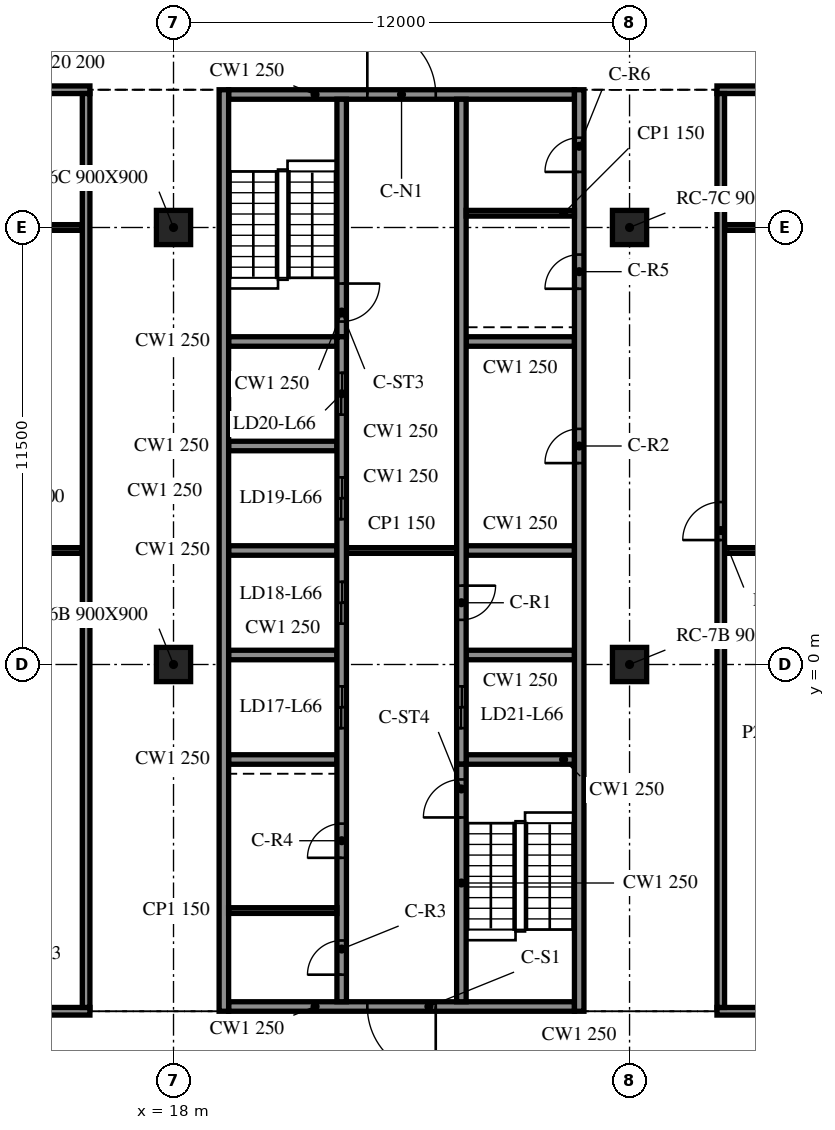
"""IFC4 building model, lengths in metres.
Left out: names, types, materials, properties, quantities, classifications, styles, units other than length and angle.
Written with IfcOpenShell. Run it as: python <this file> out.ifc"""

import sys

from ifc_helpers import new_model, si_unit, direction, frame, frame_2d, origin, origin_2d, place, context, subcontext, project, spatial, rectangle, extrude, element, fill, save


model = new_model("IFC4")
c1 = context("Model", 3, precision=1e-05, world=origin(), true_north=direction((0.0, 1.0)))
c2 = subcontext(c1, "Body", "Model", "MODEL_VIEW")
j1 = project(units=[si_unit("LENGTHUNIT", "METRE"), si_unit("PLANEANGLEUNIT", "RADIAN")], contexts=[c1])
p1 = place(None, origin())
s1 = spatial("IfcSite", under=j1, at=p1, CompositionType="ELEMENT")
p2 = place(p1, origin())
s2 = spatial("IfcBuilding", under=s1, at=p2, CompositionType="ELEMENT")
p3 = place(p2, frame((0.0, 0.0, 270.9)))
s3 = spatial("IfcBuildingStorey", under=s2, at=p3, CompositionType="ELEMENT", Elevation=270.9)
for number, where, z_axis, x_axis in (
    (1, (18.0, 0.0, -0.34), (0.0, 0.0, 1.0), (1.0, 0.0, 0.0)),
    (2, (18.0, 11.5, -0.34), (0.0, 0.0, 1.0), (1.0, 0.0, 0.0)),
    (3, (30.0, 0.0, -0.34), (0.0, 0.0, 1.0), (1.0, 0.0, 0.0)),
    (4, (30.0, 11.5, -0.34), (0.0, 0.0, 1.0), (1.0, 0.0, 0.0)),
):
    element("IfcColumn", number, at=place(p3, frame(where, z_axis=z_axis, x_axis=x_axis)), inside=s3, PredefinedType="COLUMN", context=c2, shape_type="SweptSolid", body=[
        extrude(rectangle(XDim=0.9, YDim=0.9, at=origin_2d()), origin(), (0.0, 0.0, 1.0), 3.8),
    ])
p4 = place(p3, frame((19.325, 15.125, 0.0), z_axis=(0.0, 0.0, 1.0), x_axis=(0.0, -1.0, 0.0)))
e5 = element("IfcWall", 5, at=p4, inside=s3, PredefinedType="SOLIDWALL", context=c2, shape_type="SweptSolid", body=[
    extrude(rectangle(XDim=24.25, YDim=0.25, at=frame_2d((12.125, 0.0))), origin(), (0.0, 0.0, 1.0), 3.46),
])
p5 = place(p3, frame((28.675, -9.125, 0.0), z_axis=(0.0, 0.0, 1.0), x_axis=(0.0, 1.0, 0.0)))
e6 = element("IfcWall", 6, at=p5, inside=s3, PredefinedType="SOLIDWALL", context=c2, shape_type="SweptSolid", body=[
    extrude(rectangle(XDim=24.25, YDim=0.25, at=frame_2d((12.125, 0.0))), origin(), (0.0, 0.0, 1.0), 3.46),
])
p6 = place(p5, frame((14.425, 0.0, 0.0)))
e7 = element("IfcOpeningElement", 7, at=p6, cuts=e6, PredefinedType="OPENING", context=c2, shape_type="SweptSolid", body=[
    extrude(rectangle(XDim=0.9, YDim=2.1, at=frame_2d((0.45, 1.05))), frame((0.0, 0.135, 0.0), z_axis=(0.0, -1.0, 0.0), x_axis=(1.0, 0.0, 0.0)), (0.0, 0.0, 1.0), 0.27),
])
p7 = place(p5, frame((19.012, 0.0, 0.0)))
e8 = element("IfcOpeningElement", 8, at=p7, cuts=e6, PredefinedType="OPENING", context=c2, shape_type="SweptSolid", body=[
    extrude(rectangle(XDim=0.9, YDim=2.1, at=frame_2d((0.45, 1.05))), frame((0.0, 0.135, 0.0), z_axis=(0.0, -1.0, 0.0), x_axis=(1.0, 0.0, 0.0)), (0.0, 0.0, 1.0), 0.27),
])
p8 = place(p5, frame((22.087, 0.0, 0.0)))
e9 = element("IfcOpeningElement", 9, at=p8, cuts=e6, PredefinedType="OPENING", context=c2, shape_type="SweptSolid", body=[
    extrude(rectangle(XDim=0.9, YDim=2.1, at=frame_2d((0.45, 1.05))), frame((0.0, 0.135, 0.0), z_axis=(0.0, -1.0, 0.0), x_axis=(1.0, 0.0, 0.0)), (0.0, 0.0, 1.0), 0.27),
])
p9 = place(p3, frame((28.55, -9.0, 0.0), z_axis=(0.0, 0.0, 1.0), x_axis=(-1.0, 0.0, 0.0)))
e10 = element("IfcWall", 10, at=p9, inside=s3, PredefinedType="SOLIDWALL", context=c2, shape_type="SweptSolid", body=[
    extrude(rectangle(XDim=9.1, YDim=0.25, at=frame_2d((4.55, 0.0))), origin(), (0.0, 0.0, 1.0), 3.46),
])
p10 = place(p9, frame((3.65, 0.0, 0.0)))
e11 = element("IfcOpeningElement", 11, at=p10, cuts=e10, PredefinedType="OPENING", context=c2, shape_type="SweptSolid", body=[
    extrude(rectangle(XDim=1.8, YDim=2.1, at=frame_2d((0.9, 1.05))), frame((0.0, 0.135, 0.0), z_axis=(0.0, -1.0, 0.0), x_axis=(1.0, 0.0, 0.0)), (0.0, 0.0, 1.0), 0.27),
])
p11 = place(p3, frame((19.45, 15.0, 0.0), z_axis=(0.0, 0.0, 1.0), x_axis=(1.0, 0.0, 0.0)))
e12 = element("IfcWall", 12, at=p11, inside=s3, PredefinedType="SOLIDWALL", context=c2, shape_type="SweptSolid", body=[
    extrude(rectangle(XDim=9.1, YDim=0.25, at=frame_2d((4.55, 0.0))), origin(), (0.0, 0.0, 1.0), 3.46),
])
p12 = place(p11, frame((3.65, 0.0, 0.0)))
e13 = element("IfcOpeningElement", 13, at=p12, cuts=e12, PredefinedType="OPENING", context=c2, shape_type="SweptSolid", body=[
    extrude(rectangle(XDim=1.8, YDim=2.1, at=frame_2d((0.9, 1.05))), frame((0.0, 0.135, 0.0), z_axis=(0.0, -1.0, 0.0), x_axis=(1.0, 0.0, 0.0)), (0.0, 0.0, 1.0), 0.27),
])
p13 = place(p3, frame((22.425, -8.875, 0.0), z_axis=(0.0, 0.0, 1.0), x_axis=(0.0, 1.0, 0.0)))
e14 = element("IfcWall", 14, at=p13, inside=s3, PredefinedType="SOLIDWALL", context=c2, shape_type="SweptSolid", body=[
    extrude(rectangle(XDim=17.5, YDim=0.25, at=frame_2d((8.75, 0.0))), origin(), (0.0, 0.0, 1.0), 3.46),
])
p14 = place(p13, frame((7.2, 0.0, 0.0)))
e15 = element("IfcOpeningElement", 15, at=p14, cuts=e14, PredefinedType="OPENING", context=c2, shape_type="SweptSolid", body=[
    extrude(rectangle(XDim=1.1, YDim=2.1, at=frame_2d((0.55, 1.05))), frame((0.0, 0.135, 0.0), z_axis=(0.0, -1.0, 0.0), x_axis=(1.0, 0.0, 0.0)), (0.0, 0.0, 1.0), 0.27),
])
p15 = place(p13, frame((9.95, 0.0, 0.0)))
e16 = element("IfcOpeningElement", 16, at=p15, cuts=e14, PredefinedType="OPENING", context=c2, shape_type="SweptSolid", body=[
    extrude(rectangle(XDim=1.1, YDim=2.1, at=frame_2d((0.55, 1.05))), frame((0.0, 0.135, 0.0), z_axis=(0.0, -1.0, 0.0), x_axis=(1.0, 0.0, 0.0)), (0.0, 0.0, 1.0), 0.27),
])
p16 = place(p13, frame((12.7, 0.0, 0.0)))
e17 = element("IfcOpeningElement", 17, at=p16, cuts=e14, PredefinedType="OPENING", context=c2, shape_type="SweptSolid", body=[
    extrude(rectangle(XDim=1.1, YDim=2.1, at=frame_2d((0.55, 1.05))), frame((0.0, 0.135, 0.0), z_axis=(0.0, -1.0, 0.0), x_axis=(1.0, 0.0, 0.0)), (0.0, 0.0, 1.0), 0.27),
])
p17 = place(p13, frame((15.45, 0.0, 0.0)))
e18 = element("IfcOpeningElement", 18, at=p17, cuts=e14, PredefinedType="OPENING", context=c2, shape_type="SweptSolid", body=[
    extrude(rectangle(XDim=1.1, YDim=2.1, at=frame_2d((0.55, 1.05))), frame((0.0, 0.135, 0.0), z_axis=(0.0, -1.0, 0.0), x_axis=(1.0, 0.0, 0.0)), (0.0, 0.0, 1.0), 0.27),
])
p18 = place(p13, frame((0.712, 0.0, 0.0)))
e19 = element("IfcOpeningElement", 19, at=p18, cuts=e14, PredefinedType="OPENING", context=c2, shape_type="SweptSolid", body=[
    extrude(rectangle(XDim=0.9, YDim=2.1, at=frame_2d((0.45, 1.05))), frame((0.0, 0.135, 0.0), z_axis=(0.0, -1.0, 0.0), x_axis=(1.0, 0.0, 0.0)), (0.0, 0.0, 1.0), 0.27),
])
p19 = place(p13, frame((3.788, 0.0, 0.0)))
e20 = element("IfcOpeningElement", 20, at=p19, cuts=e14, PredefinedType="OPENING", context=c2, shape_type="SweptSolid", body=[
    extrude(rectangle(XDim=0.9, YDim=2.1, at=frame_2d((0.45, 1.05))), frame((0.0, 0.135, 0.0), z_axis=(0.0, -1.0, 0.0), x_axis=(1.0, 0.0, 0.0)), (0.0, 0.0, 1.0), 0.27),
])
p20 = place(p3, frame((22.425, 14.875, 0.0), z_axis=(0.0, 0.0, 1.0), x_axis=(0.0, -1.0, 0.0)))
e21 = element("IfcWall", 21, at=p20, inside=s3, PredefinedType="SOLIDWALL", context=c2, shape_type="SweptSolid", body=[
    extrude(rectangle(XDim=6.25, YDim=0.25, at=frame_2d((3.125, 0.0))), origin(), (0.0, 0.0, 1.0), 3.46),
])
p21 = place(p20, frame((4.85, 0.0, 0.0)))
e22 = element("IfcOpeningElement", 22, at=p21, cuts=e21, PredefinedType="OPENING", context=c2, shape_type="SweptSolid", body=[
    extrude(rectangle(XDim=1.0, YDim=2.1, at=frame_2d((0.5, 1.05))), frame((0.0, 0.135, 0.0), z_axis=(0.0, -1.0, 0.0), x_axis=(1.0, 0.0, 0.0)), (0.0, 0.0, 1.0), 0.27),
])
p22 = place(p3, frame((25.575, -8.875, 0.0), z_axis=(0.0, 0.0, 1.0), x_axis=(0.0, 1.0, 0.0)))
e23 = element("IfcWall", 23, at=p22, inside=s3, PredefinedType="SOLIDWALL", context=c2, shape_type="SweptSolid", body=[
    extrude(rectangle(XDim=6.25, YDim=0.25, at=frame_2d((3.125, 0.0))), origin(), (0.0, 0.0, 1.0), 3.46),
])
p23 = place(p22, frame((4.85, 0.0, 0.0)))
e24 = element("IfcOpeningElement", 24, at=p23, cuts=e23, PredefinedType="OPENING", context=c2, shape_type="SweptSolid", body=[
    extrude(rectangle(XDim=1.0, YDim=2.1, at=frame_2d((0.5, 1.05))), frame((0.0, 0.135, 0.0), z_axis=(0.0, -1.0, 0.0), x_axis=(1.0, 0.0, 0.0)), (0.0, 0.0, 1.0), 0.27),
])
p24 = place(p3, frame((25.575, 14.875, 0.0), z_axis=(0.0, 0.0, 1.0), x_axis=(0.0, -1.0, 0.0)))
e25 = element("IfcWall", 25, at=p24, inside=s3, PredefinedType="SOLIDWALL", context=c2, shape_type="SweptSolid", body=[
    extrude(rectangle(XDim=17.5, YDim=0.25, at=frame_2d((8.75, 0.0))), origin(), (0.0, 0.0, 1.0), 3.46),
])
p25 = place(p24, frame((15.45, 0.0, 0.0)))
e26 = element("IfcOpeningElement", 26, at=p25, cuts=e25, PredefinedType="OPENING", context=c2, shape_type="SweptSolid", body=[
    extrude(rectangle(XDim=1.1, YDim=2.1, at=frame_2d((0.55, 1.05))), frame((0.0, 0.135, 0.0), z_axis=(0.0, -1.0, 0.0), x_axis=(1.0, 0.0, 0.0)), (0.0, 0.0, 1.0), 0.27),
])
p26 = place(p24, frame((12.8, 0.0, 0.0)))
e27 = element("IfcOpeningElement", 27, at=p26, cuts=e25, PredefinedType="OPENING", context=c2, shape_type="SweptSolid", body=[
    extrude(rectangle(XDim=0.9, YDim=2.1, at=frame_2d((0.45, 1.05))), frame((0.0, 0.135, 0.0), z_axis=(0.0, -1.0, 0.0), x_axis=(1.0, 0.0, 0.0)), (0.0, 0.0, 1.0), 0.27),
])
for number, where, z_axis, x_axis in (
    (28, (19.45, -2.5, 0.0), (0.0, 0.0, 1.0), (1.0, 0.0, 0.0)),
    (29, (19.45, 0.25, 0.0), (0.0, 0.0, 1.0), (1.0, 0.0, 0.0)),
    (30, (19.45, 3.0, 0.0), (0.0, 0.0, 1.0), (1.0, 0.0, 0.0)),
    (31, (19.45, 5.75, 0.0), (0.0, 0.0, 1.0), (1.0, 0.0, 0.0)),
    (32, (19.45, 8.5, 0.0), (0.0, 0.0, 1.0), (1.0, 0.0, 0.0)),
    (33, (25.7, -2.5, 0.0), (0.0, 0.0, 1.0), (1.0, 0.0, 0.0)),
    (34, (25.7, 0.25, 0.0), (0.0, 0.0, 1.0), (1.0, 0.0, 0.0)),
    (35, (25.7, 3.0, 0.0), (0.0, 0.0, 1.0), (1.0, 0.0, 0.0)),
    (36, (25.7, 8.5, 0.0), (0.0, 0.0, 1.0), (1.0, 0.0, 0.0)),
):
    element("IfcWall", number, at=place(p3, frame(where, z_axis=z_axis, x_axis=x_axis)), inside=s3, PredefinedType="SOLIDWALL", context=c2, shape_type="SweptSolid", body=[
        extrude(rectangle(XDim=2.85, YDim=0.25, at=frame_2d((1.425, 0.0))), origin(), (0.0, 0.0, 1.0), 3.46),
    ])
p27 = place(p3, frame((22.55, 3.0, 0.0), z_axis=(0.0, 0.0, 1.0), x_axis=(1.0, 0.0, 0.0)))
e37 = element("IfcWall", 37, at=p27, inside=s3, PredefinedType="PARTITIONING", context=c2, shape_type="SweptSolid", body=[
    extrude(rectangle(XDim=2.9, YDim=0.15, at=frame_2d((1.45, 0.0))), origin(), (0.0, 0.0, 1.0), 3.46),
])
for number, where, z_axis, x_axis in (
    (38, (19.45, -6.475, 0.0), (0.0, 0.0, 1.0), (1.0, 0.0, 0.0)),
    (39, (25.7, 11.875, 0.0), (0.0, 0.0, 1.0), (1.0, 0.0, 0.0)),
):
    element("IfcWall", number, at=place(p3, frame(where, z_axis=z_axis, x_axis=x_axis)), inside=s3, PredefinedType="PARTITIONING", context=c2, shape_type="SweptSolid", body=[
        extrude(rectangle(XDim=2.85, YDim=0.15, at=frame_2d((1.425, 0.0))), origin(), (0.0, 0.0, 1.0), 3.46),
    ])
p28 = place(p3, frame((8.1, -9.125, 0.0), z_axis=(0.0, 0.0, 1.0), x_axis=(1.0, 0.0, 0.0)))
e40 = element("IfcWall", 40, at=p28, inside=s3, PredefinedType="PARTITIONING", context=c2, shape_type="SweptSolid", body=[
    extrude(rectangle(XDim=7.7, YDim=0.2, at=frame_2d((3.85, 0.0))), origin(), (0.0, 0.0, 1.0), 3.46),
])
p29 = place(p28, frame((3.3, 0.0, 0.0)))
e41 = element("IfcOpeningElement", 41, at=p29, cuts=e40, PredefinedType="OPENING", context=c2, shape_type="SweptSolid", body=[
    extrude(rectangle(XDim=1.0, YDim=2.1, at=frame_2d((0.5, 1.05))), frame((0.0, 0.11, 0.0), z_axis=(0.0, -1.0, 0.0), x_axis=(1.0, 0.0, 0.0)), (0.0, 0.0, 1.0), 0.22),
])
p30 = place(p3, frame((32.3, -9.125, 0.0), z_axis=(0.0, 0.0, 1.0), x_axis=(1.0, 0.0, 0.0)))
e42 = element("IfcWall", 42, at=p30, inside=s3, PredefinedType="PARTITIONING", context=c2, shape_type="SweptSolid", body=[
    extrude(rectangle(XDim=15.202, YDim=0.2, at=frame_2d((7.601, 0.0))), origin(), (0.0, 0.0, 1.0), 3.46),
])
p31 = place(p30, frame((7.1, 0.0, 0.0)))
e43 = element("IfcOpeningElement", 43, at=p31, cuts=e42, PredefinedType="OPENING", context=c2, shape_type="SweptSolid", body=[
    extrude(rectangle(XDim=1.0, YDim=2.1, at=frame_2d((0.5, 1.05))), frame((0.0, 0.11, 0.0), z_axis=(0.0, -1.0, 0.0), x_axis=(1.0, 0.0, 0.0)), (0.0, 0.0, 1.0), 0.22),
])
p32 = place(p3, frame((8.3, 3.0, 0.0), z_axis=(0.0, 0.0, 1.0), x_axis=(1.0, 0.0, 0.0)))
e44 = element("IfcWall", 44, at=p32, inside=s3, PredefinedType="PARTITIONING", context=c2, shape_type="SweptSolid", body=[
    extrude(rectangle(XDim=7.3, YDim=0.15, at=frame_2d((3.65, 0.0))), origin(), (0.0, 0.0, 1.0), 3.46),
])
p33 = place(p3, frame((32.5, 3.0, 0.0), z_axis=(0.0, 0.0, 1.0), x_axis=(1.0, 0.0, 0.0)))
e45 = element("IfcWall", 45, at=p33, inside=s3, PredefinedType="PARTITIONING", context=c2, shape_type="SweptSolid", body=[
    extrude(rectangle(XDim=15.475, YDim=0.15, at=frame_2d((7.738, 0.0))), origin(), (0.0, 0.0, 1.0), 3.46),
])
p34 = place(p3, frame((8.3, 11.5, 0.0), z_axis=(0.0, 0.0, 1.0), x_axis=(1.0, 0.0, 0.0)))
e46 = element("IfcWall", 46, at=p34, inside=s3, PredefinedType="PARTITIONING", context=c2, shape_type="SweptSolid", body=[
    extrude(rectangle(XDim=7.3, YDim=0.15, at=frame_2d((3.65, 0.0))), origin(), (0.0, 0.0, 1.0), 3.46),
])
p35 = place(p3, frame((32.5, 11.5, 0.0), z_axis=(0.0, 0.0, 1.0), x_axis=(1.0, 0.0, 0.0)))
e47 = element("IfcWall", 47, at=p35, inside=s3, PredefinedType="PARTITIONING", context=c2, shape_type="SweptSolid", body=[
    extrude(rectangle(XDim=9.05, YDim=0.15, at=frame_2d((4.525, 0.0))), origin(), (0.0, 0.0, 1.0), 3.46),
])
p36 = place(p3, frame((8.1, 15.125, 0.0), z_axis=(0.0, 0.0, 1.0), x_axis=(1.0, 0.0, 0.0)))
e48 = element("IfcWall", 48, at=p36, inside=s3, PredefinedType="PARTITIONING", context=c2, shape_type="SweptSolid", body=[
    extrude(rectangle(XDim=7.7, YDim=0.2, at=frame_2d((3.85, 0.0))), origin(), (0.0, 0.0, 1.0), 3.46),
])
p37 = place(p36, frame((3.3, 0.0, 0.0)))
e49 = element("IfcOpeningElement", 49, at=p37, cuts=e48, PredefinedType="OPENING", context=c2, shape_type="SweptSolid", body=[
    extrude(rectangle(XDim=1.0, YDim=2.1, at=frame_2d((0.5, 1.05))), frame((0.0, 0.11, 0.0), z_axis=(0.0, -1.0, 0.0), x_axis=(1.0, 0.0, 0.0)), (0.0, 0.0, 1.0), 0.22),
])
p38 = place(p3, frame((32.3, 15.125, 0.0), z_axis=(0.0, 0.0, 1.0), x_axis=(1.0, 0.0, 0.0)))
e50 = element("IfcWall", 50, at=p38, inside=s3, PredefinedType="PARTITIONING", context=c2, shape_type="SweptSolid", body=[
    extrude(rectangle(XDim=15.675, YDim=0.2, at=frame_2d((7.837, 0.0))), origin(), (0.0, 0.0, 1.0), 3.46),
])
p39 = place(p38, frame((7.3, 0.0, 0.0)))
e51 = element("IfcOpeningElement", 51, at=p39, cuts=e50, PredefinedType="OPENING", context=c2, shape_type="SweptSolid", body=[
    extrude(rectangle(XDim=1.0, YDim=2.1, at=frame_2d((0.5, 1.05))), frame((0.0, 0.11, 0.0), z_axis=(0.0, -1.0, 0.0), x_axis=(1.0, 0.0, 0.0)), (0.0, 0.0, 1.0), 0.22),
])
p40 = place(p3, frame((15.7, -9.025, 0.0), z_axis=(0.0, 0.0, 1.0), x_axis=(0.0, 1.0, 0.0)))
e52 = element("IfcWall", 52, at=p40, inside=s3, PredefinedType="PARTITIONING", context=c2, shape_type="SweptSolid", body=[
    extrude(rectangle(XDim=24.05, YDim=0.2, at=frame_2d((12.025, 0.0))), origin(), (0.0, 0.0, 1.0), 3.46),
])
p41 = place(p3, frame((32.4, -9.025, 0.0), z_axis=(0.0, 0.0, 1.0), x_axis=(0.0, 1.0, 0.0)))
e53 = element("IfcWall", 53, at=p41, inside=s3, PredefinedType="PARTITIONING", context=c2, shape_type="SweptSolid", body=[
    extrude(rectangle(XDim=24.05, YDim=0.2, at=frame_2d((12.025, 0.0))), origin(), (0.0, 0.0, 1.0), 3.46),
])
p42 = place(p41, frame((12.3, 0.0, 0.0)))
e54 = element("IfcOpeningElement", 54, at=p42, cuts=e53, PredefinedType="OPENING", context=c2, shape_type="SweptSolid", body=[
    extrude(rectangle(XDim=1.0, YDim=2.1, at=frame_2d((0.5, 1.05))), frame((0.0, 0.11, 0.0), z_axis=(0.0, -1.0, 0.0), x_axis=(1.0, 0.0, 0.0)), (0.0, 0.0, 1.0), 0.22),
])
p43 = place(p10, origin())
e55 = element("IfcDoor", 55, at=p43, inside=s3, OperationType="DOUBLE_DOOR_SINGLE_SWING", PredefinedType="DOOR", context=c2, shape_type="SweptSolid", body=[
    extrude(rectangle(XDim=1.8, YDim=2.1, at=frame_2d((0.9, 1.05))), frame((0.0, 0.025, 0.0), z_axis=(0.0, -1.0, 0.0), x_axis=(1.0, 0.0, 0.0)), (0.0, 0.0, 1.0), 0.05),
])
fill(e11, e55)
p44 = place(p12, origin())
e56 = element("IfcDoor", 56, at=p44, inside=s3, OperationType="DOUBLE_DOOR_SINGLE_SWING", PredefinedType="DOOR", context=c2, shape_type="SweptSolid", body=[
    extrude(rectangle(XDim=1.8, YDim=2.1, at=frame_2d((0.9, 1.05))), frame((0.0, 0.025, 0.0), z_axis=(0.0, -1.0, 0.0), x_axis=(1.0, 0.0, 0.0)), (0.0, 0.0, 1.0), 0.05),
])
fill(e13, e56)
p45 = place(p25, origin())
e57 = element("IfcDoor", 57, at=p45, inside=s3, OperationType="DOUBLE_DOOR_SLIDING", PredefinedType="DOOR", context=c2, shape_type="SweptSolid", body=[
    extrude(rectangle(XDim=1.1, YDim=2.1, at=frame_2d((0.55, 1.05))), frame((0.0, 0.025, 0.0), z_axis=(0.0, -1.0, 0.0), x_axis=(1.0, 0.0, 0.0)), (0.0, 0.0, 1.0), 0.05),
])
fill(e26, e57)
p46 = place(p14, origin())
e58 = element("IfcDoor", 58, at=p46, inside=s3, OperationType="DOUBLE_DOOR_SLIDING", PredefinedType="DOOR", context=c2, shape_type="SweptSolid", body=[
    extrude(rectangle(XDim=1.1, YDim=2.1, at=frame_2d((0.55, 1.05))), frame((0.0, 0.025, 0.0), z_axis=(0.0, -1.0, 0.0), x_axis=(1.0, 0.0, 0.0)), (0.0, 0.0, 1.0), 0.05),
])
fill(e15, e58)
p47 = place(p15, origin())
e59 = element("IfcDoor", 59, at=p47, inside=s3, OperationType="DOUBLE_DOOR_SLIDING", PredefinedType="DOOR", context=c2, shape_type="SweptSolid", body=[
    extrude(rectangle(XDim=1.1, YDim=2.1, at=frame_2d((0.55, 1.05))), frame((0.0, 0.025, 0.0), z_axis=(0.0, -1.0, 0.0), x_axis=(1.0, 0.0, 0.0)), (0.0, 0.0, 1.0), 0.05),
])
fill(e16, e59)
p48 = place(p16, origin())
e60 = element("IfcDoor", 60, at=p48, inside=s3, OperationType="DOUBLE_DOOR_SLIDING", PredefinedType="DOOR", context=c2, shape_type="SweptSolid", body=[
    extrude(rectangle(XDim=1.1, YDim=2.1, at=frame_2d((0.55, 1.05))), frame((0.0, 0.025, 0.0), z_axis=(0.0, -1.0, 0.0), x_axis=(1.0, 0.0, 0.0)), (0.0, 0.0, 1.0), 0.05),
])
fill(e17, e60)
p49 = place(p17, origin())
e61 = element("IfcDoor", 61, at=p49, inside=s3, OperationType="DOUBLE_DOOR_SLIDING", PredefinedType="DOOR", context=c2, shape_type="SweptSolid", body=[
    extrude(rectangle(XDim=1.1, YDim=2.1, at=frame_2d((0.55, 1.05))), frame((0.0, 0.025, 0.0), z_axis=(0.0, -1.0, 0.0), x_axis=(1.0, 0.0, 0.0)), (0.0, 0.0, 1.0), 0.05),
])
fill(e18, e61)
p50 = place(p26, origin())
e62 = element("IfcDoor", 62, at=p50, inside=s3, OperationType="SINGLE_SWING_LEFT", PredefinedType="DOOR", context=c2, shape_type="SweptSolid", body=[
    extrude(rectangle(XDim=0.9, YDim=2.1, at=frame_2d((0.45, 1.05))), frame((0.0, 0.025, 0.0), z_axis=(0.0, -1.0, 0.0), x_axis=(1.0, 0.0, 0.0)), (0.0, 0.0, 1.0), 0.05),
])
fill(e27, e62)
p51 = place(p6, origin())
e63 = element("IfcDoor", 63, at=p51, inside=s3, OperationType="SINGLE_SWING_RIGHT", PredefinedType="DOOR", context=c2, shape_type="SweptSolid", body=[
    extrude(rectangle(XDim=0.9, YDim=2.1, at=frame_2d((0.45, 1.05))), frame((0.0, 0.025, 0.0), z_axis=(0.0, -1.0, 0.0), x_axis=(1.0, 0.0, 0.0)), (0.0, 0.0, 1.0), 0.05),
])
fill(e7, e63)
p52 = place(p18, origin())
e64 = element("IfcDoor", 64, at=p52, inside=s3, OperationType="SINGLE_SWING_LEFT", PredefinedType="DOOR", context=c2, shape_type="SweptSolid", body=[
    extrude(rectangle(XDim=0.9, YDim=2.1, at=frame_2d((0.45, 1.05))), frame((0.0, 0.025, 0.0), z_axis=(0.0, -1.0, 0.0), x_axis=(1.0, 0.0, 0.0)), (0.0, 0.0, 1.0), 0.05),
])
fill(e19, e64)
p53 = place(p19, origin())
e65 = element("IfcDoor", 65, at=p53, inside=s3, OperationType="SINGLE_SWING_RIGHT", PredefinedType="DOOR", context=c2, shape_type="SweptSolid", body=[
    extrude(rectangle(XDim=0.9, YDim=2.1, at=frame_2d((0.45, 1.05))), frame((0.0, 0.025, 0.0), z_axis=(0.0, -1.0, 0.0), x_axis=(1.0, 0.0, 0.0)), (0.0, 0.0, 1.0), 0.05),
])
fill(e20, e65)
p54 = place(p7, origin())
e66 = element("IfcDoor", 66, at=p54, inside=s3, OperationType="SINGLE_SWING_LEFT", PredefinedType="DOOR", context=c2, shape_type="SweptSolid", body=[
    extrude(rectangle(XDim=0.9, YDim=2.1, at=frame_2d((0.45, 1.05))), frame((0.0, 0.025, 0.0), z_axis=(0.0, -1.0, 0.0), x_axis=(1.0, 0.0, 0.0)), (0.0, 0.0, 1.0), 0.05),
])
fill(e8, e66)
p55 = place(p8, origin())
e67 = element("IfcDoor", 67, at=p55, inside=s3, OperationType="SINGLE_SWING_RIGHT", PredefinedType="DOOR", context=c2, shape_type="SweptSolid", body=[
    extrude(rectangle(XDim=0.9, YDim=2.1, at=frame_2d((0.45, 1.05))), frame((0.0, 0.025, 0.0), z_axis=(0.0, -1.0, 0.0), x_axis=(1.0, 0.0, 0.0)), (0.0, 0.0, 1.0), 0.05),
])
fill(e9, e67)
p56 = place(p21, origin())
e68 = element("IfcDoor", 68, at=p56, inside=s3, OperationType="SINGLE_SWING_LEFT", PredefinedType="DOOR", context=c2, shape_type="SweptSolid", body=[
    extrude(rectangle(XDim=1.0, YDim=2.1, at=frame_2d((0.5, 1.05))), frame((0.0, 0.025, 0.0), z_axis=(0.0, -1.0, 0.0), x_axis=(1.0, 0.0, 0.0)), (0.0, 0.0, 1.0), 0.05),
])
fill(e22, e68)
p57 = place(p23, origin())
e69 = element("IfcDoor", 69, at=p57, inside=s3, OperationType="SINGLE_SWING_RIGHT", PredefinedType="DOOR", context=c2, shape_type="SweptSolid", body=[
    extrude(rectangle(XDim=1.0, YDim=2.1, at=frame_2d((0.5, 1.05))), frame((0.0, 0.025, 0.0), z_axis=(0.0, -1.0, 0.0), x_axis=(1.0, 0.0, 0.0)), (0.0, 0.0, 1.0), 0.05),
])
fill(e24, e69)
p58 = place(p42, origin())
e70 = element("IfcDoor", 70, at=p58, inside=s3, OperationType="SINGLE_SWING_LEFT", PredefinedType="DOOR", context=c2, shape_type="SweptSolid", body=[
    extrude(rectangle(XDim=1.0, YDim=2.1, at=frame_2d((0.5, 1.05))), frame((0.0, 0.025, 0.0), z_axis=(0.0, -1.0, 0.0), x_axis=(1.0, 0.0, 0.0)), (0.0, 0.0, 1.0), 0.05),
])
fill(e54, e70)
save(model, sys.argv[1])
